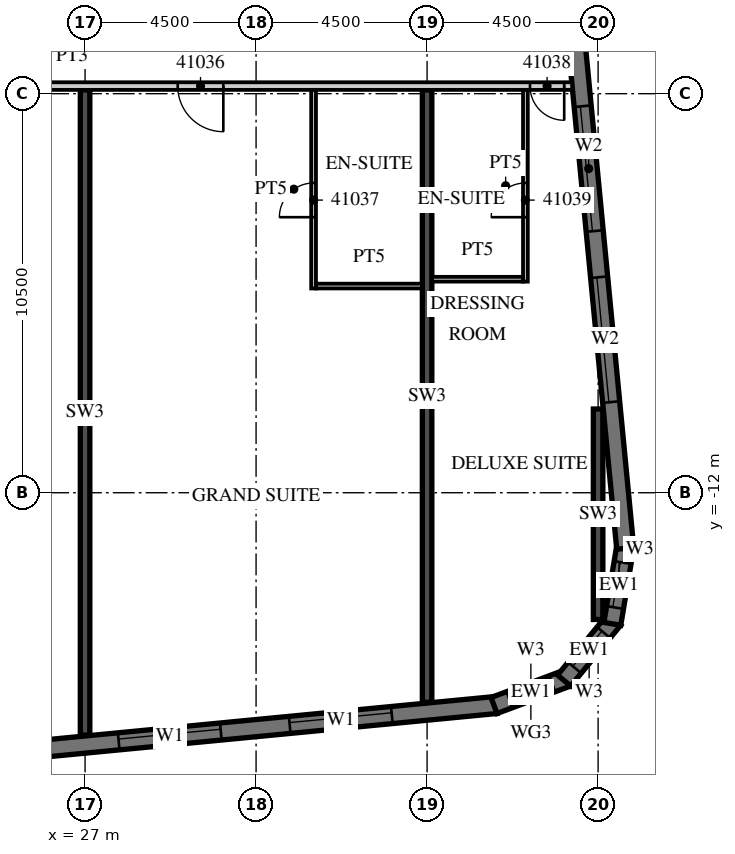
"""IFC4 building model, lengths in metres.
Left out: names, types, materials, properties, quantities, classifications, styles, units other than length and angle.
Written with IfcOpenShell. Run it as: python <this file> out.ifc"""

import sys

from ifc_helpers import new_model, si_unit, direction, frame, frame_2d, origin, place, context, subcontext, project, spatial, polyline, rectangle, outline, extrude, element, fill, save


model = new_model("IFC4")
c1 = context("Model", 3, precision=1e-05, world=origin(), true_north=direction((0.0, 1.0)))
c2 = subcontext(c1, "Body", "Model", "MODEL_VIEW")
j1 = project(units=[si_unit("LENGTHUNIT", "METRE"), si_unit("PLANEANGLEUNIT", "RADIAN")], contexts=[c1])
p1 = place(None, origin())
s1 = spatial("IfcSite", under=j1, at=p1, CompositionType="ELEMENT")
p2 = place(p1, origin())
s2 = spatial("IfcBuilding", under=s1, at=p2, CompositionType="ELEMENT")
p3 = place(p2, frame((0.0, 0.0, 176.8)))
s3 = spatial("IfcBuildingStorey", under=s2, at=p3, CompositionType="ELEMENT", Elevation=176.8)
p4 = place(p3, frame((27.0, -18.379, 0.0), z_axis=(0.0, 0.0, 1.0), x_axis=(0.0, 1.0, 0.0)))
e1 = element("IfcWall", 1, at=p4, inside=s3, PredefinedType="SHEAR", context=c2, shape_type="SweptSolid", body=[
    extrude(rectangle(XDim=16.979, YDim=0.25, at=frame_2d((8.489, 0.0))), origin(), (0.0, 0.0, 1.0), 3.3),
])
p5 = place(p3, frame((36.0, -17.512, 0.0), z_axis=(0.0, 0.0, 1.0), x_axis=(0.0, 1.0, 0.0)))
e2 = element("IfcWall", 2, at=p5, inside=s3, PredefinedType="SHEAR", context=c2, shape_type="SweptSolid", body=[
    extrude(rectangle(XDim=16.112, YDim=0.25, at=frame_2d((8.056, 0.0))), origin(), (0.0, 0.0, 1.0), 3.3),
])
p6 = place(p3, frame((40.5, -15.335, 0.0), z_axis=(0.0, 0.0, 1.0), x_axis=(0.0, 1.0, 0.0)))
e3 = element("IfcWall", 3, at=p6, inside=s3, PredefinedType="SHEAR", context=c2, shape_type="SweptSolid", body=[
    extrude(rectangle(XDim=5.538, YDim=0.25, at=frame_2d((2.769, 0.0))), origin(), (0.0, 0.0, 1.0), 3.3),
])
p7 = place(p3, frame((-13.521, -22.529, 0.0), z_axis=(0.0, 0.0, 1.0), x_axis=(0.995396436651, 0.095843277819, 0.0)))
e4 = element("IfcWall", 4, at=p7, inside=s3, PredefinedType="SOLIDWALL", context=c2, shape_type="SweptSolid", body=[
    extrude(rectangle(XDim=51.578, YDim=0.45, at=frame_2d((25.789, 0.0))), origin(), (0.0, 0.0, 1.0), 3.02),
])
p8 = place(p7, frame((0.91, 0.0, 0.45)))
e5 = element("IfcOpeningElement", 5, at=p8, cuts=e4, PredefinedType="OPENING", context=c2, shape_type="SweptSolid", body=[
    extrude(rectangle(XDim=2.7, YDim=2.25, at=frame_2d((1.35, 1.125))), frame((0.0, 0.235, 0.0), z_axis=(0.0, -1.0, 0.0), x_axis=(1.0, 0.0, 0.0)), (0.0, 0.0, 1.0), 0.47),
])
p9 = place(p7, frame((5.431, 0.0, 0.45)))
e6 = element("IfcOpeningElement", 6, at=p9, cuts=e4, PredefinedType="OPENING", context=c2, shape_type="SweptSolid", body=[
    extrude(rectangle(XDim=2.7, YDim=2.25, at=frame_2d((1.35, 1.125))), frame((0.0, 0.235, 0.0), z_axis=(0.0, -1.0, 0.0), x_axis=(1.0, 0.0, 0.0)), (0.0, 0.0, 1.0), 0.47),
])
p10 = place(p7, frame((9.952, 0.0, 0.45)))
e7 = element("IfcOpeningElement", 7, at=p10, cuts=e4, PredefinedType="OPENING", context=c2, shape_type="SweptSolid", body=[
    extrude(rectangle(XDim=2.7, YDim=2.25, at=frame_2d((1.35, 1.125))), frame((0.0, 0.235, 0.0), z_axis=(0.0, -1.0, 0.0), x_axis=(1.0, 0.0, 0.0)), (0.0, 0.0, 1.0), 0.47),
])
p11 = place(p7, frame((14.473, 0.0, 0.45)))
e8 = element("IfcOpeningElement", 8, at=p11, cuts=e4, PredefinedType="OPENING", context=c2, shape_type="SweptSolid", body=[
    extrude(rectangle(XDim=2.7, YDim=2.25, at=frame_2d((1.35, 1.125))), frame((0.0, 0.235, 0.0), z_axis=(0.0, -1.0, 0.0), x_axis=(1.0, 0.0, 0.0)), (0.0, 0.0, 1.0), 0.47),
])
p12 = place(p7, frame((18.994, 0.0, 0.45)))
e9 = element("IfcOpeningElement", 9, at=p12, cuts=e4, PredefinedType="OPENING", context=c2, shape_type="SweptSolid", body=[
    extrude(rectangle(XDim=2.7, YDim=2.25, at=frame_2d((1.35, 1.125))), frame((0.0, 0.235, 0.0), z_axis=(0.0, -1.0, 0.0), x_axis=(1.0, 0.0, 0.0)), (0.0, 0.0, 1.0), 0.47),
])
p13 = place(p7, frame((23.514, 0.0, 0.45)))
e10 = element("IfcOpeningElement", 10, at=p13, cuts=e4, PredefinedType="OPENING", context=c2, shape_type="SweptSolid", body=[
    extrude(rectangle(XDim=2.7, YDim=2.25, at=frame_2d((1.35, 1.125))), frame((0.0, 0.235, 0.0), z_axis=(0.0, -1.0, 0.0), x_axis=(1.0, 0.0, 0.0)), (0.0, 0.0, 1.0), 0.47),
])
p14 = place(p7, frame((28.035, 0.0, 0.45)))
e11 = element("IfcOpeningElement", 11, at=p14, cuts=e4, PredefinedType="OPENING", context=c2, shape_type="SweptSolid", body=[
    extrude(rectangle(XDim=2.7, YDim=2.25, at=frame_2d((1.35, 1.125))), frame((0.0, 0.235, 0.0), z_axis=(0.0, -1.0, 0.0), x_axis=(1.0, 0.0, 0.0)), (0.0, 0.0, 1.0), 0.47),
])
p15 = place(p7, frame((32.556, 0.0, 0.45)))
e12 = element("IfcOpeningElement", 12, at=p15, cuts=e4, PredefinedType="OPENING", context=c2, shape_type="SweptSolid", body=[
    extrude(rectangle(XDim=2.7, YDim=2.25, at=frame_2d((1.35, 1.125))), frame((0.0, 0.235, 0.0), z_axis=(0.0, -1.0, 0.0), x_axis=(1.0, 0.0, 0.0)), (0.0, 0.0, 1.0), 0.47),
])
p16 = place(p7, frame((37.077, 0.0, 0.45)))
e13 = element("IfcOpeningElement", 13, at=p16, cuts=e4, PredefinedType="OPENING", context=c2, shape_type="SweptSolid", body=[
    extrude(rectangle(XDim=2.7, YDim=2.25, at=frame_2d((1.35, 1.125))), frame((0.0, 0.235, 0.0), z_axis=(0.0, -1.0, 0.0), x_axis=(1.0, 0.0, 0.0)), (0.0, 0.0, 1.0), 0.47),
])
p17 = place(p7, frame((41.598, 0.0, 0.45)))
e14 = element("IfcOpeningElement", 14, at=p17, cuts=e4, PredefinedType="OPENING", context=c2, shape_type="SweptSolid", body=[
    extrude(rectangle(XDim=2.7, YDim=2.25, at=frame_2d((1.35, 1.125))), frame((0.0, 0.235, 0.0), z_axis=(0.0, -1.0, 0.0), x_axis=(1.0, 0.0, 0.0)), (0.0, 0.0, 1.0), 0.47),
])
p18 = place(p7, frame((46.119, 0.0, 0.45)))
e15 = element("IfcOpeningElement", 15, at=p18, cuts=e4, PredefinedType="OPENING", context=c2, shape_type="SweptSolid", body=[
    extrude(rectangle(XDim=2.7, YDim=2.25, at=frame_2d((1.35, 1.125))), frame((0.0, 0.235, 0.0), z_axis=(0.0, -1.0, 0.0), x_axis=(1.0, 0.0, 0.0)), (0.0, 0.0, 1.0), 0.47),
])
p19 = place(p3, frame((37.761, -17.598, 0.0), z_axis=(0.0, 0.0, 1.0), x_axis=(0.936677599948, 0.350192909346, 0.0)))
e16 = element("IfcWall", 16, at=p19, inside=s3, PredefinedType="SOLIDWALL", context=c2, shape_type="SweptSolid", body=[
    extrude(outline(polyline([(0.0, -0.225), (2.071, -0.225), (1.95, 0.225), (0.121, 0.225), (0.0, -0.225)])), origin(), (0.0, 0.0, 1.0), 3.02),
])
p20 = place(p19, frame((0.435, 0.0, 0.45)))
e17 = element("IfcOpeningElement", 17, at=p20, cuts=e16, PredefinedType="OPENING", context=c2, shape_type="SweptSolid", body=[
    extrude(rectangle(XDim=1.2, YDim=2.25, at=frame_2d((0.6, 1.125))), frame((0.0, 0.235, 0.0), z_axis=(0.0, -1.0, 0.0), x_axis=(1.0, 0.0, 0.0)), (0.0, 0.0, 1.0), 0.47),
])
p21 = place(p3, frame((39.606, -16.941, 0.0), z_axis=(0.0, 0.0, 1.0), x_axis=(0.636116318187, 0.771593176315, 0.0)))
e18 = element("IfcWall", 18, at=p21, inside=s3, PredefinedType="SOLIDWALL", context=c2, shape_type="SweptSolid", body=[
    extrude(outline(polyline([(0.0, -0.225), (2.071, -0.225), (1.95, 0.225), (0.121, 0.225), (0.0, -0.225)])), origin(), (0.0, 0.0, 1.0), 3.02),
])
p22 = place(p21, frame((0.435, 0.0, 0.45)))
e19 = element("IfcOpeningElement", 19, at=p22, cuts=e18, PredefinedType="OPENING", context=c2, shape_type="SweptSolid", body=[
    extrude(rectangle(XDim=1.2, YDim=2.25, at=frame_2d((0.6, 1.125))), frame((0.0, 0.235, 0.0), z_axis=(0.0, -1.0, 0.0), x_axis=(1.0, 0.0, 0.0)), (0.0, 0.0, 1.0), 0.47),
])
p23 = place(p3, frame((40.875, -15.449, 0.0), z_axis=(0.0, 0.0, 1.0), x_axis=(0.164953448126, 0.986301353518, 0.0)))
e20 = element("IfcWall", 20, at=p23, inside=s3, PredefinedType="SOLIDWALL", context=c2, shape_type="SweptSolid", body=[
    extrude(outline(polyline([(0.0, -0.225), (2.071, -0.225), (1.95, 0.225), (0.121, 0.225), (0.0, -0.225)])), origin(), (0.0, 0.0, 1.0), 3.02),
])
p24 = place(p23, frame((0.435, 0.0, 0.45)))
e21 = element("IfcOpeningElement", 21, at=p24, cuts=e20, PredefinedType="OPENING", context=c2, shape_type="SweptSolid", body=[
    extrude(rectangle(XDim=1.2, YDim=2.25, at=frame_2d((0.6, 1.125))), frame((0.0, 0.235, 0.0), z_axis=(0.0, -1.0, 0.0), x_axis=(1.0, 0.0, 0.0)), (0.0, 0.0, 1.0), 0.47),
])
p25 = place(p3, frame((41.214, -13.466, 0.0), z_axis=(0.0, 0.0, 1.0), x_axis=(-0.095847314626, 0.995396047952, 0.0)))
e22 = element("IfcWall", 22, at=p25, inside=s3, PredefinedType="SOLIDWALL", context=c2, shape_type="SweptSolid", body=[
    extrude(rectangle(XDim=34.0, YDim=0.45, at=frame_2d((17.0, 0.0))), origin(), (0.0, 0.0, 1.0), 3.02),
])
p26 = place(p25, frame((3.869, 0.0, 0.45)))
e23 = element("IfcOpeningElement", 23, at=p26, cuts=e22, PredefinedType="OPENING", context=c2, shape_type="SweptSolid", body=[
    extrude(rectangle(XDim=3.3, YDim=2.25, at=frame_2d((1.65, 1.125))), frame((0.0, 0.235, 0.0), z_axis=(0.0, -1.0, 0.0), x_axis=(1.0, 0.0, 0.0)), (0.0, 0.0, 1.0), 0.47),
])
p27 = place(p25, frame((8.39, 0.0, 0.45)))
e24 = element("IfcOpeningElement", 24, at=p27, cuts=e22, PredefinedType="OPENING", context=c2, shape_type="SweptSolid", body=[
    extrude(rectangle(XDim=3.3, YDim=2.25, at=frame_2d((1.65, 1.125))), frame((0.0, 0.235, 0.0), z_axis=(0.0, -1.0, 0.0), x_axis=(1.0, 0.0, 0.0)), (0.0, 0.0, 1.0), 0.47),
])
p28 = place(p3, frame((13.5, -1.3, 0.0), z_axis=(0.0, 0.0, 1.0), x_axis=(1.0, 0.0, 0.0)))
e25 = element("IfcWall", 25, at=p28, inside=s3, PredefinedType="PARTITIONING", context=c2, shape_type="SweptSolid", body=[
    extrude(rectangle(XDim=26.317, YDim=0.2, at=frame_2d((13.158, 0.0))), origin(), (0.0, 0.0, 1.0), 3.02),
])
p29 = place(p28, frame((2.925, 0.0, 0.0)))
e26 = element("IfcOpeningElement", 26, at=p29, cuts=e25, PredefinedType="OPENING", context=c2, shape_type="SweptSolid", body=[
    extrude(rectangle(XDim=1.0, YDim=2.1, at=frame_2d((0.5, 1.05))), frame((0.0, 0.11, 0.0), z_axis=(0.0, -1.0, 0.0), x_axis=(1.0, 0.0, 0.0)), (0.0, 0.0, 1.0), 0.22),
])
p30 = place(p28, frame((9.862, 0.0, 0.0)))
e27 = element("IfcOpeningElement", 27, at=p30, cuts=e25, PredefinedType="OPENING", context=c2, shape_type="SweptSolid", body=[
    extrude(rectangle(XDim=1.2, YDim=2.1, at=frame_2d((0.6, 1.05))), frame((0.0, 0.11, 0.0), z_axis=(0.0, -1.0, 0.0), x_axis=(1.0, 0.0, 0.0)), (0.0, 0.0, 1.0), 0.22),
])
p31 = place(p28, frame((15.938, 0.0, 0.0)))
e28 = element("IfcOpeningElement", 28, at=p31, cuts=e25, PredefinedType="OPENING", context=c2, shape_type="SweptSolid", body=[
    extrude(rectangle(XDim=1.2, YDim=2.1, at=frame_2d((0.6, 1.05))), frame((0.0, 0.11, 0.0), z_axis=(0.0, -1.0, 0.0), x_axis=(1.0, 0.0, 0.0)), (0.0, 0.0, 1.0), 0.22),
])
p32 = place(p28, frame((25.208, 0.0, 0.0)))
e29 = element("IfcOpeningElement", 29, at=p32, cuts=e25, PredefinedType="OPENING", context=c2, shape_type="SweptSolid", body=[
    extrude(rectangle(XDim=0.9, YDim=2.1, at=frame_2d((0.45, 1.05))), frame((0.0, 0.11, 0.0), z_axis=(0.0, -1.0, 0.0), x_axis=(1.0, 0.0, 0.0)), (0.0, 0.0, 1.0), 0.22),
])
p33 = place(p3, frame((33.013, -6.625, 0.0), z_axis=(0.0, 0.0, 1.0), x_axis=(0.0, 1.0, 0.0)))
e30 = element("IfcWall", 30, at=p33, inside=s3, PredefinedType="PARTITIONING", context=c2, shape_type="SweptSolid", body=[
    extrude(rectangle(XDim=5.225, YDim=0.125, at=frame_2d((2.613, 0.0))), origin(), (0.0, 0.0, 1.0), 3.02),
])
p34 = place(p33, frame((1.875, 0.0, 0.0)))
e31 = element("IfcOpeningElement", 31, at=p34, cuts=e30, PredefinedType="OPENING", context=c2, shape_type="SweptSolid", body=[
    extrude(rectangle(XDim=0.9, YDim=2.1, at=frame_2d((0.45, 1.05))), frame((0.0, 0.073, 0.0), z_axis=(0.0, -1.0, 0.0), x_axis=(1.0, 0.0, 0.0)), (0.0, 0.0, 1.0), 0.145),
])
p35 = place(p3, frame((33.075, -6.562, 0.0), z_axis=(0.0, 0.0, 1.0), x_axis=(1.0, 0.0, 0.0)))
e32 = element("IfcWall", 32, at=p35, inside=s3, PredefinedType="PARTITIONING", context=c2, shape_type="SweptSolid", body=[
    extrude(rectangle(XDim=2.8, YDim=0.125, at=frame_2d((1.4, 0.0))), origin(), (0.0, 0.0, 1.0), 3.02),
])
p36 = place(p3, frame((38.587, -6.445, 0.0), z_axis=(0.0, 0.0, 1.0), x_axis=(0.0, 1.0, 0.0)))
e33 = element("IfcWall", 33, at=p36, inside=s3, PredefinedType="PARTITIONING", context=c2, shape_type="SweptSolid", body=[
    extrude(rectangle(XDim=5.045, YDim=0.125, at=frame_2d((2.522, 0.0))), origin(), (0.0, 0.0, 1.0), 3.02),
])
p37 = place(p36, frame((1.695, 0.0, 0.0)))
e34 = element("IfcOpeningElement", 34, at=p37, cuts=e33, PredefinedType="OPENING", context=c2, shape_type="SweptSolid", body=[
    extrude(rectangle(XDim=0.9, YDim=2.1, at=frame_2d((0.45, 1.05))), frame((0.0, 0.073, 0.0), z_axis=(0.0, -1.0, 0.0), x_axis=(1.0, 0.0, 0.0)), (0.0, 0.0, 1.0), 0.145),
])
p38 = place(p3, frame((36.125, -6.382, 0.0), z_axis=(0.0, 0.0, 1.0), x_axis=(1.0, 0.0, 0.0)))
e35 = element("IfcWall", 35, at=p38, inside=s3, PredefinedType="PARTITIONING", context=c2, shape_type="SweptSolid", body=[
    extrude(rectangle(XDim=2.4, YDim=0.125, at=frame_2d((1.2, 0.0))), origin(), (0.0, 0.0, 1.0), 3.02),
])
p39 = place(p17, origin())
e36 = element("IfcWindow", 36, at=p39, inside=s3, PartitioningType="SINGLE_PANEL", PredefinedType="WINDOW", context=c2, shape_type="SweptSolid", body=[
    extrude(rectangle(XDim=2.7, YDim=2.25, at=frame_2d((1.35, 1.125))), frame((0.0, 0.09, 0.0), z_axis=(0.0, -1.0, 0.0), x_axis=(1.0, 0.0, 0.0)), (0.0, 0.0, 1.0), 0.06),
])
fill(e14, e36)
p40 = place(p18, origin())
e37 = element("IfcWindow", 37, at=p40, inside=s3, PartitioningType="SINGLE_PANEL", PredefinedType="WINDOW", context=c2, shape_type="SweptSolid", body=[
    extrude(rectangle(XDim=2.7, YDim=2.25, at=frame_2d((1.35, 1.125))), frame((0.0, 0.09, 0.0), z_axis=(0.0, -1.0, 0.0), x_axis=(1.0, 0.0, 0.0)), (0.0, 0.0, 1.0), 0.06),
])
fill(e15, e37)
p41 = place(p20, origin())
e38 = element("IfcWindow", 38, at=p41, inside=s3, PartitioningType="SINGLE_PANEL", PredefinedType="WINDOW", context=c2, shape_type="SweptSolid", body=[
    extrude(rectangle(XDim=1.2, YDim=2.25, at=frame_2d((0.6, 1.125))), frame((0.0, 0.09, 0.0), z_axis=(0.0, -1.0, 0.0), x_axis=(1.0, 0.0, 0.0)), (0.0, 0.0, 1.0), 0.06),
])
fill(e17, e38)
p42 = place(p22, origin())
e39 = element("IfcWindow", 39, at=p42, inside=s3, PartitioningType="SINGLE_PANEL", PredefinedType="WINDOW", context=c2, shape_type="SweptSolid", body=[
    extrude(rectangle(XDim=1.2, YDim=2.25, at=frame_2d((0.6, 1.125))), frame((0.0, 0.09, 0.0), z_axis=(0.0, -1.0, 0.0), x_axis=(1.0, 0.0, 0.0)), (0.0, 0.0, 1.0), 0.06),
])
fill(e19, e39)
p43 = place(p24, origin())
e40 = element("IfcWindow", 40, at=p43, inside=s3, PartitioningType="SINGLE_PANEL", PredefinedType="WINDOW", context=c2, shape_type="SweptSolid", body=[
    extrude(rectangle(XDim=1.2, YDim=2.25, at=frame_2d((0.6, 1.125))), frame((0.0, 0.09, 0.0), z_axis=(0.0, -1.0, 0.0), x_axis=(1.0, 0.0, 0.0)), (0.0, 0.0, 1.0), 0.06),
])
fill(e21, e40)
p44 = place(p26, origin())
e41 = element("IfcWindow", 41, at=p44, inside=s3, PartitioningType="SINGLE_PANEL", PredefinedType="WINDOW", context=c2, shape_type="SweptSolid", body=[
    extrude(rectangle(XDim=3.3, YDim=2.25, at=frame_2d((1.65, 1.125))), frame((0.0, 0.09, 0.0), z_axis=(0.0, -1.0, 0.0), x_axis=(1.0, 0.0, 0.0)), (0.0, 0.0, 1.0), 0.06),
])
fill(e23, e41)
p45 = place(p27, origin())
e42 = element("IfcWindow", 42, at=p45, inside=s3, PartitioningType="SINGLE_PANEL", PredefinedType="WINDOW", context=c2, shape_type="SweptSolid", body=[
    extrude(rectangle(XDim=3.3, YDim=2.25, at=frame_2d((1.65, 1.125))), frame((0.0, 0.09, 0.0), z_axis=(0.0, -1.0, 0.0), x_axis=(1.0, 0.0, 0.0)), (0.0, 0.0, 1.0), 0.06),
])
fill(e24, e42)
p46 = place(p31, origin())
e43 = element("IfcDoor", 43, at=p46, inside=s3, OperationType="SINGLE_SWING_RIGHT", PredefinedType="DOOR", context=c2, shape_type="SweptSolid", body=[
    extrude(rectangle(XDim=1.2, YDim=2.1, at=frame_2d((0.6, 1.05))), frame((0.0, 0.025, 0.0), z_axis=(0.0, -1.0, 0.0), x_axis=(1.0, 0.0, 0.0)), (0.0, 0.0, 1.0), 0.05),
])
fill(e28, e43)
p47 = place(p34, origin())
e44 = element("IfcDoor", 44, at=p47, inside=s3, OperationType="SINGLE_SWING_LEFT", PredefinedType="DOOR", context=c2, shape_type="SweptSolid", body=[
    extrude(rectangle(XDim=0.9, YDim=2.1, at=frame_2d((0.45, 1.05))), frame((0.0, 0.025, 0.0), z_axis=(0.0, -1.0, 0.0), x_axis=(1.0, 0.0, 0.0)), (0.0, 0.0, 1.0), 0.05),
])
fill(e31, e44)
p48 = place(p32, origin())
e45 = element("IfcDoor", 45, at=p48, inside=s3, OperationType="SINGLE_SWING_RIGHT", PredefinedType="DOOR", context=c2, shape_type="SweptSolid", body=[
    extrude(rectangle(XDim=0.9, YDim=2.1, at=frame_2d((0.45, 1.05))), frame((0.0, 0.025, 0.0), z_axis=(0.0, -1.0, 0.0), x_axis=(1.0, 0.0, 0.0)), (0.0, 0.0, 1.0), 0.05),
])
fill(e29, e45)
p49 = place(p37, origin())
e46 = element("IfcDoor", 46, at=p49, inside=s3, OperationType="SINGLE_SWING_LEFT", PredefinedType="DOOR", context=c2, shape_type="SweptSolid", body=[
    extrude(rectangle(XDim=0.9, YDim=2.1, at=frame_2d((0.45, 1.05))), frame((0.0, 0.025, 0.0), z_axis=(0.0, -1.0, 0.0), x_axis=(1.0, 0.0, 0.0)), (0.0, 0.0, 1.0), 0.05),
])
fill(e34, e46)
save(model, sys.argv[1])
